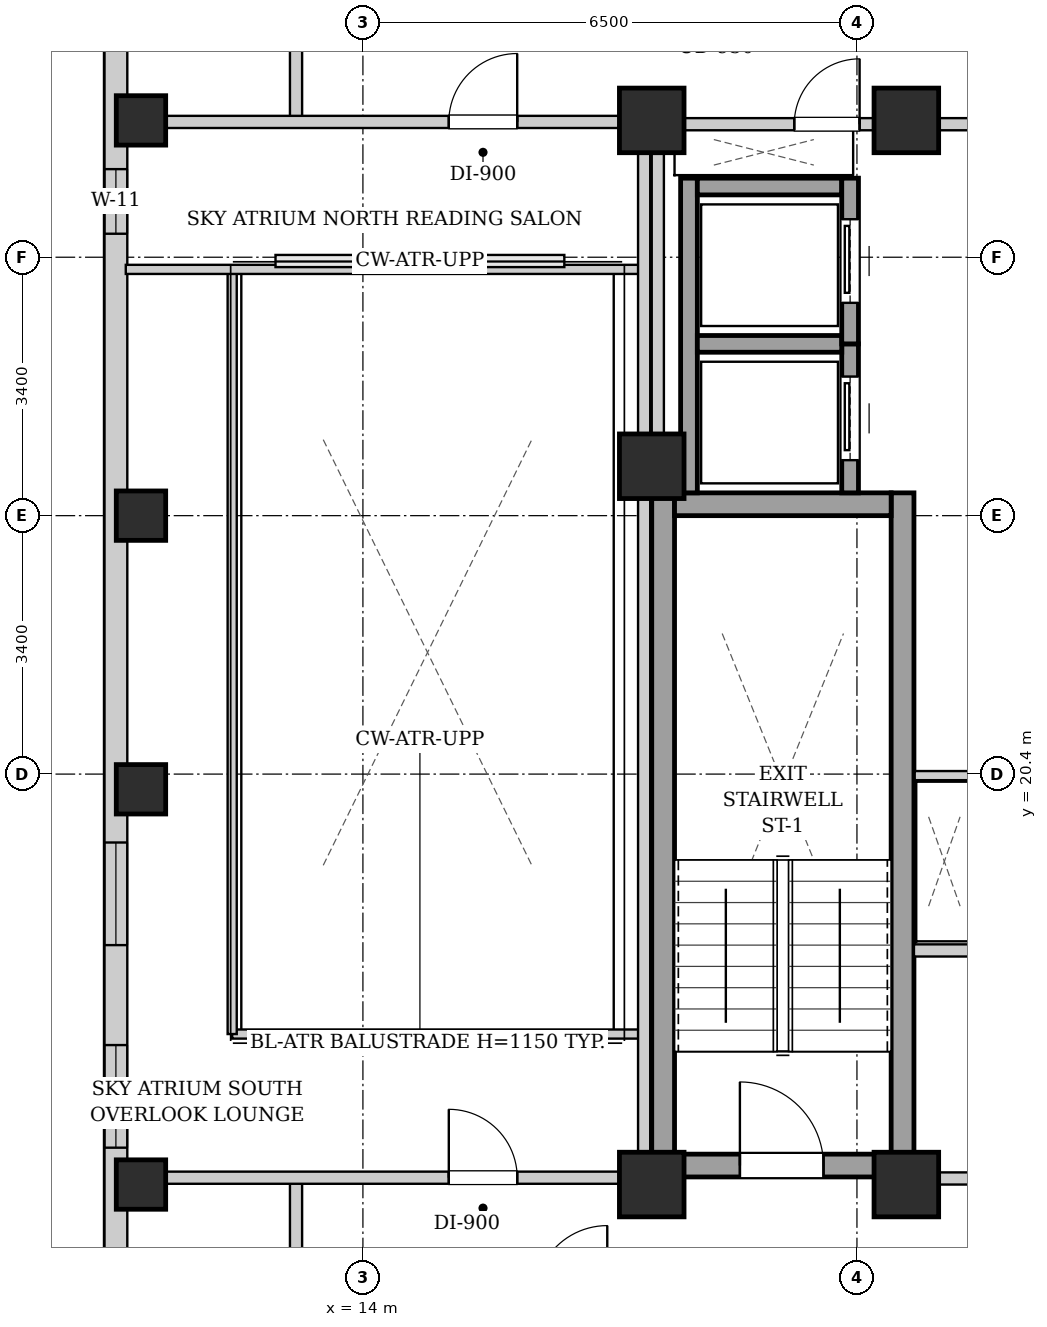
"""IFC4 building model, lengths in metres.
Left out: names, types, materials, properties, quantities, classifications, styles, units other than length and angle.
Written with IfcOpenShell. Run it as: python <this file> out.ifc"""

import sys

from ifc_helpers import new_model, si_unit, direction, frame, frame_2d, origin, origin_2d, place, context, subcontext, project, spatial, rectangle, extrude, element, fill, save


model = new_model("IFC4")
c1 = context("Model", 3, precision=1e-05, world=origin(), true_north=direction((0.0, 1.0)))
c2 = subcontext(c1, "Body", "Model", "MODEL_VIEW")
j1 = project(units=[si_unit("LENGTHUNIT", "METRE"), si_unit("PLANEANGLEUNIT", "RADIAN")], contexts=[c1])
p1 = place(None, origin())
s1 = spatial("IfcSite", under=j1, at=p1, CompositionType="ELEMENT")
p2 = place(p1, origin())
s2 = spatial("IfcBuilding", under=s1, at=p2, CompositionType="ELEMENT")
p3 = place(p2, frame((0.0, 0.0, 184.3)))
s3 = spatial("IfcBuildingStorey", under=s2, at=p3, CompositionType="ELEMENT", Elevation=184.3)
for number, where, z_axis, x_axis in (
    (1, (11.08, 15.0, 0.0), (0.0, 0.0, 1.0), (1.0, 0.0, 0.0)),
    (2, (11.08, 20.2, 0.0), (0.0, 0.0, 1.0), (1.0, 0.0, 0.0)),
    (3, (11.08, 23.8, 0.0), (0.0, 0.0, 1.0), (1.0, 0.0, 0.0)),
    (4, (11.08, 29.0, 0.0), (0.0, 0.0, 1.0), (1.0, 0.0, 0.0)),
):
    element("IfcColumn", number, at=place(p3, frame(where, z_axis=z_axis, x_axis=x_axis)), inside=s3, PredefinedType="COLUMN", context=c2, shape_type="SweptSolid", body=[
        extrude(rectangle(XDim=0.65, YDim=0.65, at=origin_2d()), origin(), (0.0, 0.0, 1.0), 3.3),
    ])
for number, where, z_axis, x_axis in (
    (5, (17.8, 15.0, 0.0), (0.0, 0.0, 1.0), (1.0, 0.0, 0.0)),
    (6, (21.15, 15.0, 0.0), (0.0, 0.0, 1.0), (1.0, 0.0, 0.0)),
    (7, (17.8, 29.0, 0.0), (0.0, 0.0, 1.0), (1.0, 0.0, 0.0)),
    (8, (21.15, 29.0, 0.0), (0.0, 0.0, 1.0), (1.0, 0.0, 0.0)),
    (9, (17.8, 24.45, 0.0), (0.0, 0.0, 1.0), (1.0, 0.0, 0.0)),
):
    element("IfcColumn", number, at=place(p3, frame(where, z_axis=z_axis, x_axis=x_axis)), inside=s3, PredefinedType="COLUMN", context=c2, shape_type="SweptSolid", body=[
        extrude(rectangle(XDim=0.85, YDim=0.85, at=origin_2d()), origin(), (0.0, 0.0, 1.0), 3.3),
    ])
p4 = place(p3, frame((10.75, 6.3, 0.0), z_axis=(0.0, 0.0, 1.0), x_axis=(0.0, 1.0, 0.0)))
e10 = element("IfcWall", 10, at=p4, inside=s3, PredefinedType="SOLIDWALL", context=c2, shape_type="SweptSolid", body=[
    extrude(rectangle(XDim=31.4, YDim=0.3, at=frame_2d((15.7, 0.0))), origin(), (0.0, 0.0, 1.0), 3.04),
])
p5 = place(p4, frame((1.653, 0.0, 0.55)))
e11 = element("IfcOpeningElement", 11, at=p5, cuts=e10, PredefinedType="OPENING", context=c2, shape_type="SweptSolid", body=[
    extrude(rectangle(XDim=1.35, YDim=1.2, at=frame_2d((0.675, 0.6))), frame((0.0, 0.16, 0.0), z_axis=(0.0, -1.0, 0.0), x_axis=(1.0, 0.0, 0.0)), (0.0, 0.0, 1.0), 0.32),
])
p6 = place(p4, frame((11.85, 0.0, 0.55)))
e12 = element("IfcOpeningElement", 12, at=p6, cuts=e10, PredefinedType="OPENING", context=c2, shape_type="SweptSolid", body=[
    extrude(rectangle(XDim=1.35, YDim=1.2, at=frame_2d((0.675, 0.6))), frame((0.0, 0.16, 0.0), z_axis=(0.0, -1.0, 0.0), x_axis=(1.0, 0.0, 0.0)), (0.0, 0.0, 1.0), 0.32),
])
p7 = place(p4, frame((9.185, 0.0, 0.55)))
e13 = element("IfcOpeningElement", 13, at=p7, cuts=e10, PredefinedType="OPENING", context=c2, shape_type="SweptSolid", body=[
    extrude(rectangle(XDim=1.35, YDim=1.2, at=frame_2d((0.675, 0.6))), frame((0.0, 0.16, 0.0), z_axis=(0.0, -1.0, 0.0), x_axis=(1.0, 0.0, 0.0)), (0.0, 0.0, 1.0), 0.32),
])
p8 = place(p4, frame((21.209, 0.0, 0.55)))
e14 = element("IfcOpeningElement", 14, at=p8, cuts=e10, PredefinedType="OPENING", context=c2, shape_type="SweptSolid", body=[
    extrude(rectangle(XDim=0.85, YDim=1.2, at=frame_2d((0.425, 0.6))), frame((0.0, 0.16, 0.0), z_axis=(0.0, -1.0, 0.0), x_axis=(1.0, 0.0, 0.0)), (0.0, 0.0, 1.0), 0.32),
])
for number, where, z_axis, x_axis in (
    (15, (17.95, 15.1, 0.0), (0.0, 0.0, 1.0), (0.0, 1.0, 0.0)),
    (16, (21.1, 15.1, 0.0), (0.0, 0.0, 1.0), (0.0, 1.0, 0.0)),
):
    element("IfcWall", number, at=place(p3, frame(where, z_axis=z_axis, x_axis=x_axis)), inside=s3, PredefinedType="SHEAR", context=c2, shape_type="SweptSolid", body=[
        extrude(rectangle(XDim=9.0, YDim=0.3, at=frame_2d((4.5, 0.0))), origin(), (0.0, 0.0, 1.0), 3.04),
    ])
p9 = place(p3, frame((18.1, 23.95, 0.0), z_axis=(0.0, 0.0, 1.0), x_axis=(1.0, 0.0, 0.0)))
e17 = element("IfcWall", 17, at=p9, inside=s3, PredefinedType="SHEAR", context=c2, shape_type="SweptSolid", body=[
    extrude(rectangle(XDim=2.85, YDim=0.3, at=frame_2d((1.425, 0.0))), origin(), (0.0, 0.0, 1.0), 3.04),
])
p10 = place(p3, frame((18.1, 15.25, 0.0), z_axis=(0.0, 0.0, 1.0), x_axis=(1.0, 0.0, 0.0)))
e18 = element("IfcWall", 18, at=p10, inside=s3, PredefinedType="SHEAR", context=c2, shape_type="SweptSolid", body=[
    extrude(rectangle(XDim=2.85, YDim=0.3, at=frame_2d((1.425, 0.0))), origin(), (0.0, 0.0, 1.0), 3.04),
])
p11 = place(p10, frame((0.86, 0.0, 0.0)))
e19 = element("IfcOpeningElement", 19, at=p11, cuts=e18, PredefinedType="OPENING", context=c2, shape_type="SweptSolid", body=[
    extrude(rectangle(XDim=1.1, YDim=2.05, at=frame_2d((0.55, 1.025))), frame((0.0, 0.16, 0.0), z_axis=(0.0, -1.0, 0.0), x_axis=(1.0, 0.0, 0.0)), (0.0, 0.0, 1.0), 0.32),
])
p12 = place(p3, frame((18.29, 24.1, 0.0), z_axis=(0.0, 0.0, 1.0), x_axis=(0.0, 1.0, 0.0)))
e20 = element("IfcWall", 20, at=p12, inside=s3, PredefinedType="SHEAR", context=c2, shape_type="SweptSolid", body=[
    extrude(rectangle(XDim=4.14, YDim=0.22, at=frame_2d((2.07, 0.0))), origin(), (0.0, 0.0, 1.0), 3.04),
])
p13 = place(p3, frame((20.41, 24.1, 0.0), z_axis=(0.0, 0.0, 1.0), x_axis=(0.0, 1.0, 0.0)))
e21 = element("IfcWall", 21, at=p13, inside=s3, PredefinedType="SHEAR", context=c2, shape_type="SweptSolid", body=[
    extrude(rectangle(XDim=1.96, YDim=0.22, at=frame_2d((0.98, 0.0))), origin(), (0.0, 0.0, 1.0), 3.04),
])
p14 = place(p13, frame((0.43, 0.0, 0.0)))
e22 = element("IfcOpeningElement", 22, at=p14, cuts=e21, PredefinedType="OPENING", context=c2, shape_type="SweptSolid", body=[
    extrude(rectangle(XDim=1.1, YDim=2.15, at=frame_2d((0.55, 1.075))), frame((0.0, 0.12, 0.0), z_axis=(0.0, -1.0, 0.0), x_axis=(1.0, 0.0, 0.0)), (0.0, 0.0, 1.0), 0.24),
])
for number, where, z_axis, x_axis in (
    (23, (18.4, 26.06, 0.0), (0.0, 0.0, 1.0), (1.0, 0.0, 0.0)),
    (24, (18.4, 28.13, 0.0), (0.0, 0.0, 1.0), (1.0, 0.0, 0.0)),
):
    element("IfcWall", number, at=place(p3, frame(where, z_axis=z_axis, x_axis=x_axis)), inside=s3, PredefinedType="SHEAR", context=c2, shape_type="SweptSolid", body=[
        extrude(rectangle(XDim=1.9, YDim=0.22, at=frame_2d((0.95, 0.0))), origin(), (0.0, 0.0, 1.0), 3.04),
    ])
p15 = place(p3, frame((20.41, 26.06, 0.0), z_axis=(0.0, 0.0, 1.0), x_axis=(0.0, 1.0, 0.0)))
e25 = element("IfcWall", 25, at=p15, inside=s3, PredefinedType="SHEAR", context=c2, shape_type="SweptSolid", body=[
    extrude(rectangle(XDim=2.18, YDim=0.22, at=frame_2d((1.09, 0.0))), origin(), (0.0, 0.0, 1.0), 3.04),
])
p16 = place(p15, frame((0.54, 0.0, 0.0)))
e26 = element("IfcOpeningElement", 26, at=p16, cuts=e25, PredefinedType="OPENING", context=c2, shape_type="SweptSolid", body=[
    extrude(rectangle(XDim=1.1, YDim=2.15, at=frame_2d((0.55, 1.075))), frame((0.0, 0.12, 0.0), z_axis=(0.0, -1.0, 0.0), x_axis=(1.0, 0.0, 0.0)), (0.0, 0.0, 1.0), 0.24),
])
p17 = place(p3, frame((21.25, 15.08, 0.0), z_axis=(0.0, 0.0, 1.0), x_axis=(1.0, 0.0, 0.0)))
e27 = element("IfcWall", 27, at=p17, inside=s3, PredefinedType="PARTITIONING", context=c2, shape_type="SweptSolid", body=[
    extrude(rectangle(XDim=8.5, YDim=0.16, at=frame_2d((4.25, 0.0))), origin(), (0.0, 0.0, 1.0), 2.556),
])
p18 = place(p17, frame((3.725, 0.0, 0.0)))
e28 = element("IfcOpeningElement", 28, at=p18, cuts=e27, PredefinedType="OPENING", context=c2, shape_type="SweptSolid", body=[
    extrude(rectangle(XDim=1.05, YDim=2.05, at=frame_2d((0.525, 1.025))), frame((0.0, 0.09, 0.0), z_axis=(0.0, -1.0, 0.0), x_axis=(1.0, 0.0, 0.0)), (0.0, 0.0, 1.0), 0.18),
])
p19 = place(p3, frame((21.25, 18.08, 0.0), z_axis=(0.0, 0.0, 1.0), x_axis=(1.0, 0.0, 0.0)))
e29 = element("IfcWall", 29, at=p19, inside=s3, PredefinedType="PARTITIONING", context=c2, shape_type="SweptSolid", body=[
    extrude(rectangle(XDim=1.1, YDim=0.16, at=frame_2d((0.55, 0.0))), origin(), (0.0, 0.0, 1.0), 3.04),
])
p20 = place(p3, frame((17.88, 24.12, 0.0), z_axis=(0.0, 0.0, 1.0), x_axis=(0.0, 1.0, 0.0)))
e30 = element("IfcWall", 30, at=p20, inside=s3, PredefinedType="PARTITIONING", context=c2, shape_type="SweptSolid", body=[
    extrude(rectangle(XDim=4.76, YDim=0.16, at=frame_2d((2.38, 0.0))), origin(), (0.0, 0.0, 1.0), 3.04),
])
p21 = place(p3, frame((17.96, 28.95, 0.0), z_axis=(0.0, 0.0, 1.0), x_axis=(1.0, 0.0, 0.0)))
e31 = element("IfcWall", 31, at=p21, inside=s3, PredefinedType="PARTITIONING", context=c2, shape_type="SweptSolid", body=[
    extrude(rectangle(XDim=4.29, YDim=0.16, at=frame_2d((2.145, 0.0))), origin(), (0.0, 0.0, 1.0), 2.556),
])
p22 = place(p21, frame((1.715, 0.0, 0.0)))
e32 = element("IfcOpeningElement", 32, at=p22, cuts=e31, PredefinedType="OPENING", context=c2, shape_type="SweptSolid", body=[
    extrude(rectangle(XDim=0.86, YDim=2.05, at=frame_2d((0.43, 1.025))), frame((0.0, 0.09, 0.0), z_axis=(0.0, -1.0, 0.0), x_axis=(1.0, 0.0, 0.0)), (0.0, 0.0, 1.0), 0.18),
])
p23 = place(p3, frame((22.28, 20.38, 0.0), z_axis=(0.0, 0.0, 1.0), x_axis=(-1.0, 0.0, 0.0)))
e33 = element("IfcWall", 33, at=p23, inside=s3, PredefinedType="PARTITIONING", context=c2, shape_type="SweptSolid", body=[
    extrude(rectangle(XDim=1.02, YDim=0.12, at=frame_2d((0.51, 0.0))), origin(), (0.0, 0.0, 1.0), 3.04),
])
for number, where, z_axis, x_axis in (
    (34, (13.12, 13.51, 0.0), (0.0, 0.0, 1.0), (0.0, 1.0, 0.0)),
    (35, (13.12, 28.98, 0.0), (0.0, 0.0, 1.0), (0.0, 1.0, 0.0)),
):
    element("IfcWall", number, at=place(p3, frame(where, z_axis=z_axis, x_axis=x_axis)), inside=s3, PredefinedType="PARTITIONING", context=c2, shape_type="SweptSolid", body=[
        extrude(rectangle(XDim=1.58, YDim=0.16, at=frame_2d((0.79, 0.0))), origin(), (0.0, 0.0, 1.0), 3.04),
    ])
p24 = place(p3, frame((10.88, 15.09, 0.0), z_axis=(0.0, 0.0, 1.0), x_axis=(1.0, 0.0, 0.0)))
e36 = element("IfcWall", 36, at=p24, inside=s3, PredefinedType="PARTITIONING", context=c2, shape_type="SweptSolid", body=[
    extrude(rectangle(XDim=6.88, YDim=0.16, at=frame_2d((3.44, 0.0))), origin(), (0.0, 0.0, 1.0), 2.556),
])
p25 = place(p24, frame((4.25, 0.0, 0.0)))
e37 = element("IfcOpeningElement", 37, at=p25, cuts=e36, PredefinedType="OPENING", context=c2, shape_type="SweptSolid", body=[
    extrude(rectangle(XDim=0.9, YDim=2.05, at=frame_2d((0.45, 1.025))), frame((0.0, 0.09, 0.0), z_axis=(0.0, -1.0, 0.0), x_axis=(1.0, 0.0, 0.0)), (0.0, 0.0, 1.0), 0.18),
])
p26 = place(p3, frame((12.28, 16.98, 0.0), z_axis=(0.0, 0.0, 1.0), x_axis=(1.0, 0.0, 0.0)))
e38 = element("IfcWall", 38, at=p26, inside=s3, PredefinedType="PARTITIONING", context=c2, shape_type="SweptSolid", body=[
    extrude(rectangle(XDim=5.48, YDim=0.12, at=frame_2d((2.74, 0.0))), origin(), (0.0, 0.0, 1.0), 3.04),
])
p27 = place(p3, frame((12.28, 16.98, 0.0), z_axis=(0.0, 0.0, 1.0), x_axis=(0.0, 1.0, 0.0)))
e39 = element("IfcWall", 39, at=p27, inside=s3, PredefinedType="PARTITIONING", context=c2, shape_type="SweptSolid", body=[
    extrude(rectangle(XDim=10.04, YDim=0.12, at=frame_2d((5.02, 0.0))), origin(), (0.0, 0.0, 1.0), 3.04),
])
p28 = place(p3, frame((10.88, 28.98, 0.0), z_axis=(0.0, 0.0, 1.0), x_axis=(1.0, 0.0, 0.0)))
e40 = element("IfcWall", 40, at=p28, inside=s3, PredefinedType="PARTITIONING", context=c2, shape_type="SweptSolid", body=[
    extrude(rectangle(XDim=6.88, YDim=0.16, at=frame_2d((3.44, 0.0))), origin(), (0.0, 0.0, 1.0), 2.556),
])
p29 = place(p28, frame((4.25, 0.0, 0.0)))
e41 = element("IfcOpeningElement", 41, at=p29, cuts=e40, PredefinedType="OPENING", context=c2, shape_type="SweptSolid", body=[
    extrude(rectangle(XDim=0.9, YDim=2.05, at=frame_2d((0.45, 1.025))), frame((0.0, 0.09, 0.0), z_axis=(0.0, -1.0, 0.0), x_axis=(1.0, 0.0, 0.0)), (0.0, 0.0, 1.0), 0.18),
])
p30 = place(p3, frame((10.88, 27.04, 0.0), z_axis=(0.0, 0.0, 1.0), x_axis=(1.0, 0.0, 0.0)))
e42 = element("IfcWall", 42, at=p30, inside=s3, PredefinedType="PARTITIONING", context=c2, shape_type="SweptSolid", body=[
    extrude(rectangle(XDim=6.88, YDim=0.12, at=frame_2d((3.44, 0.0))), origin(), (0.0, 0.0, 1.0), 3.04),
])
p31 = place(p3, frame((17.7, 15.02, 0.0), z_axis=(0.0, 0.0, 1.0), x_axis=(0.0, 1.0, 0.0)))
e43 = element("IfcWall", 43, at=p31, inside=s3, PredefinedType="PARTITIONING", context=c2, shape_type="SweptSolid", body=[
    extrude(rectangle(XDim=13.98, YDim=0.16, at=frame_2d((6.99, 0.0))), origin(), (0.0, 0.0, 1.0), 3.04),
])
p32 = place(p11, origin())
e44 = element("IfcDoor", 44, at=p32, inside=s3, OperationType="SINGLE_SWING_LEFT", PredefinedType="DOOR", context=c2, shape_type="SweptSolid", body=[
    extrude(rectangle(XDim=1.1, YDim=2.05, at=frame_2d((0.55, 1.025))), frame((0.0, 0.025, 0.0), z_axis=(0.0, -1.0, 0.0), x_axis=(1.0, 0.0, 0.0)), (0.0, 0.0, 1.0), 0.05),
])
fill(e19, e44)
p33 = place(p14, origin())
e45 = element("IfcDoor", 45, at=p33, inside=s3, OperationType="SLIDING_TO_LEFT", PredefinedType="DOOR", context=c2, shape_type="SweptSolid", body=[
    extrude(rectangle(XDim=1.1, YDim=2.15, at=frame_2d((0.55, 1.075))), frame((0.0, 0.025, 0.0), z_axis=(0.0, -1.0, 0.0), x_axis=(1.0, 0.0, 0.0)), (0.0, 0.0, 1.0), 0.05),
])
fill(e22, e45)
p34 = place(p16, origin())
e46 = element("IfcDoor", 46, at=p34, inside=s3, OperationType="SLIDING_TO_LEFT", PredefinedType="DOOR", context=c2, shape_type="SweptSolid", body=[
    extrude(rectangle(XDim=1.1, YDim=2.15, at=frame_2d((0.55, 1.075))), frame((0.0, 0.025, 0.0), z_axis=(0.0, -1.0, 0.0), x_axis=(1.0, 0.0, 0.0)), (0.0, 0.0, 1.0), 0.05),
])
fill(e26, e46)
p35 = place(p22, origin())
e47 = element("IfcDoor", 47, at=p35, inside=s3, OperationType="SINGLE_SWING_RIGHT", PredefinedType="DOOR", context=c2, shape_type="SweptSolid", body=[
    extrude(rectangle(XDim=0.86, YDim=2.05, at=frame_2d((0.43, 1.025))), frame((0.0, 0.025, 0.0), z_axis=(0.0, -1.0, 0.0), x_axis=(1.0, 0.0, 0.0)), (0.0, 0.0, 1.0), 0.05),
])
fill(e32, e47)
p36 = place(p25, origin())
e48 = element("IfcDoor", 48, at=p36, inside=s3, OperationType="SINGLE_SWING_LEFT", PredefinedType="DOOR", context=c2, shape_type="SweptSolid", body=[
    extrude(rectangle(XDim=0.9, YDim=2.05, at=frame_2d((0.45, 1.025))), frame((0.0, 0.025, 0.0), z_axis=(0.0, -1.0, 0.0), x_axis=(1.0, 0.0, 0.0)), (0.0, 0.0, 1.0), 0.05),
])
fill(e37, e48)
p37 = place(p29, origin())
e49 = element("IfcDoor", 49, at=p37, inside=s3, OperationType="SINGLE_SWING_RIGHT", PredefinedType="DOOR", context=c2, shape_type="SweptSolid", body=[
    extrude(rectangle(XDim=0.9, YDim=2.05, at=frame_2d((0.45, 1.025))), frame((0.0, 0.025, 0.0), z_axis=(0.0, -1.0, 0.0), x_axis=(1.0, 0.0, 0.0)), (0.0, 0.0, 1.0), 0.05),
])
fill(e41, e49)
p38 = place(p6, origin())
e50 = element("IfcWindow", 50, at=p38, inside=s3, PartitioningType="SINGLE_PANEL", PredefinedType="WINDOW", context=c2, shape_type="SweptSolid", body=[
    extrude(rectangle(XDim=1.35, YDim=1.2, at=frame_2d((0.675, 0.6))), frame((0.0, 0.03, 0.0), z_axis=(0.0, -1.0, 0.0), x_axis=(1.0, 0.0, 0.0)), (0.0, 0.0, 1.0), 0.06),
])
fill(e12, e50)
p39 = place(p7, origin())
e51 = element("IfcWindow", 51, at=p39, inside=s3, PartitioningType="SINGLE_PANEL", PredefinedType="WINDOW", context=c2, shape_type="SweptSolid", body=[
    extrude(rectangle(XDim=1.35, YDim=1.2, at=frame_2d((0.675, 0.6))), frame((0.0, 0.03, 0.0), z_axis=(0.0, -1.0, 0.0), x_axis=(1.0, 0.0, 0.0)), (0.0, 0.0, 1.0), 0.06),
])
fill(e13, e51)
p40 = place(p8, origin())
e52 = element("IfcWindow", 52, at=p40, inside=s3, PartitioningType="SINGLE_PANEL", PredefinedType="WINDOW", context=c2, shape_type="SweptSolid", body=[
    extrude(rectangle(XDim=0.85, YDim=1.2, at=frame_2d((0.425, 0.6))), frame((0.0, 0.03, 0.0), z_axis=(0.0, -1.0, 0.0), x_axis=(1.0, 0.0, 0.0)), (0.0, 0.0, 1.0), 0.06),
])
fill(e14, e52)
save(model, sys.argv[1])
